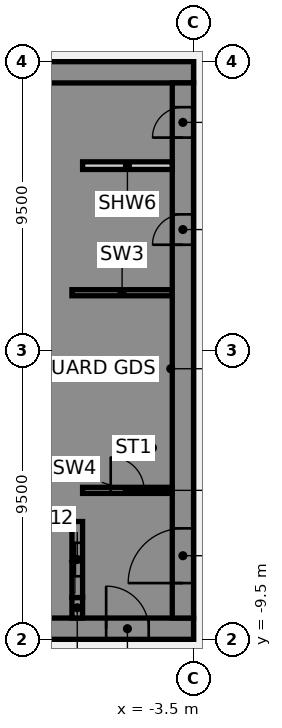
"""IFC4 building model, lengths in metres.
Left out: names, types, materials, properties, quantities, classifications, styles, units other than length and angle.
Written with IfcOpenShell. Run it as: python <this file> out.ifc"""

import sys

from ifc_helpers import new_model, si_unit, direction, frame, frame_2d, origin, place, context, subcontext, project, spatial, polyline, rectangle, outline, extrude, element, fill, save


model = new_model("IFC4")
c1 = context("Model", 3, precision=1e-05, world=origin(), true_north=direction((0.0, 1.0)))
c2 = subcontext(c1, "Body", "Model", "MODEL_VIEW")
j1 = project(units=[si_unit("LENGTHUNIT", "METRE"), si_unit("PLANEANGLEUNIT", "RADIAN")], contexts=[c1])
p1 = place(None, origin())
s1 = spatial("IfcSite", under=j1, at=p1, CompositionType="ELEMENT")
p2 = place(p1, origin())
s2 = spatial("IfcBuilding", under=s1, at=p2, CompositionType="ELEMENT")
p3 = place(p2, frame((0.0, 0.0, 56.5)))
s3 = spatial("IfcBuildingStorey", under=s2, at=p3, CompositionType="ELEMENT", Elevation=56.5)
p4 = place(p3, frame((-16.5, -9.15, 0.0), z_axis=(0.0, 0.0, 1.0), x_axis=(1.0, 0.0, 0.0)))
e1 = element("IfcWall", 1, at=p4, inside=s3, PredefinedType="SHEAR", context=c2, shape_type="SweptSolid", body=[
    extrude(rectangle(XDim=13.0, YDim=0.7, at=frame_2d((6.5, 0.0))), origin(), (0.0, 0.0, 1.0), 3.61),
])
p5 = place(p4, frame((4.15, 0.0, 0.0)))
e2 = element("IfcOpeningElement", 2, at=p5, cuts=e1, PredefinedType="OPENING", context=c2, shape_type="SweptSolid", body=[
    extrude(rectangle(XDim=1.4, YDim=2.1, at=frame_2d((0.7, 1.05))), frame((0.0, 0.36, 0.0), z_axis=(0.0, -1.0, 0.0), x_axis=(1.0, 0.0, 0.0)), (0.0, 0.0, 1.0), 0.72),
])
p6 = place(p4, frame((10.125, 0.0, 0.0)))
e3 = element("IfcOpeningElement", 3, at=p6, cuts=e1, PredefinedType="OPENING", context=c2, shape_type="SweptSolid", body=[
    extrude(rectangle(XDim=1.4, YDim=2.1, at=frame_2d((0.7, 1.05))), frame((0.0, 0.36, 0.0), z_axis=(0.0, -1.0, 0.0), x_axis=(1.0, 0.0, 0.0)), (0.0, 0.0, 1.0), 0.72),
])
p7 = place(p3, frame((-16.5, 9.15, 0.0), z_axis=(0.0, 0.0, 1.0), x_axis=(1.0, 0.0, 0.0)))
e4 = element("IfcWall", 4, at=p7, inside=s3, PredefinedType="SHEAR", context=c2, shape_type="SweptSolid", body=[
    extrude(rectangle(XDim=13.0, YDim=0.7, at=frame_2d((6.5, 0.0))), origin(), (0.0, 0.0, 1.0), 3.61),
])
p8 = place(p3, origin())
e5 = element("IfcWall", 5, at=p8, inside=s3, PredefinedType="SHEAR", context=c2, shape_type="SweptSolid", body=[
    extrude(outline(polyline([(-9.8, -5.375), (-9.8, -5.625), (-7.5, -5.625), (-7.15, -5.625), (-7.15, 8.8), (-7.5, 8.8), (-9.8, 8.8), (-9.8, 8.125), (-7.5, 8.125), (-7.5, 5.625), (-9.8, 5.625), (-9.8, 5.375), (-7.5, 5.375), (-7.5, 2.875), (-9.8, 2.875), (-9.8, 2.625), (-7.5, 2.625), (-7.5, 0.125), (-9.8, 0.125), (-9.8, -0.125), (-7.5, -0.125), (-7.5, -2.625), (-9.8, -2.625), (-9.8, -2.875), (-7.5, -2.875), (-7.5, -5.375), (-9.8, -5.375)])), origin(), (0.0, 0.0, 1.0), 3.61),
])
p9 = place(p3, origin())
e6 = element("IfcWall", 6, at=p9, inside=s3, PredefinedType="SHEAR", context=c2, shape_type="SweptSolid", body=[
    extrude(outline(polyline([(-7.5, -8.125), (-9.55, -8.125), (-9.55, -5.625), (-9.8, -5.625), (-9.8, -8.125), (-9.8, -8.8), (-7.5, -8.8), (-7.5, -8.125)])), origin(), (0.0, 0.0, 1.0), 3.61),
])
p10 = place(p3, frame((-7.325, -8.8, 0.0), z_axis=(0.0, 0.0, 1.0), x_axis=(0.0, 1.0, 0.0)))
e7 = element("IfcWall", 7, at=p10, inside=s3, PredefinedType="SHEAR", context=c2, shape_type="SweptSolid", body=[
    extrude(rectangle(XDim=0.675, YDim=0.35, at=frame_2d((0.337, 0.0))), origin(), (0.0, 0.0, 1.0), 3.61),
])
p11 = place(p3, frame((-7.5, 1.9, 0.0), z_axis=(0.0, 0.0, 1.0), x_axis=(1.0, 0.0, 0.0)))
e8 = element("IfcWall", 8, at=p11, inside=s3, PredefinedType="SHEAR", context=c2, shape_type="SweptSolid", body=[
    extrude(rectangle(XDim=3.3, YDim=0.2, at=frame_2d((1.65, 0.0))), origin(), (0.0, 0.0, 1.0), 3.61),
])
p12 = place(p3, frame((-7.325, -8.125, 0.0), z_axis=(0.0, 0.0, 1.0), x_axis=(0.0, 1.0, 0.0)))
e9 = element("IfcWall", 9, at=p12, inside=s3, PredefinedType="SHEAR", context=c2, shape_type="SweptSolid", body=[
    extrude(rectangle(XDim=2.5, YDim=0.35, at=frame_2d((1.25, 0.0))), origin(), (0.0, 0.0, 1.0), 3.61),
])
p13 = place(p12, frame((0.7, 0.0, 0.0)))
e10 = element("IfcOpeningElement", 10, at=p13, cuts=e9, PredefinedType="OPENING", context=c2, shape_type="SweptSolid", body=[
    extrude(rectangle(XDim=1.1, YDim=2.1, at=frame_2d((0.55, 1.05))), frame((0.0, 0.185, 0.0), z_axis=(0.0, -1.0, 0.0), x_axis=(1.0, 0.0, 0.0)), (0.0, 0.0, 1.0), 0.37),
])
p14 = place(p3, frame((-3.85, -8.8, 0.0), z_axis=(0.0, 0.0, 1.0), x_axis=(0.0, 1.0, 0.0)))
e11 = element("IfcWall", 11, at=p14, inside=s3, PredefinedType="SHEAR", context=c2, shape_type="SweptSolid", body=[
    extrude(rectangle(XDim=17.6, YDim=0.7, at=frame_2d((8.8, 0.0))), origin(), (0.0, 0.0, 1.0), 3.61),
])
p15 = place(p14, frame((1.15, 0.0, 0.0)))
e12 = element("IfcOpeningElement", 12, at=p15, cuts=e11, PredefinedType="OPENING", context=c2, shape_type="SweptSolid", body=[
    extrude(rectangle(XDim=1.8, YDim=2.1, at=frame_2d((0.9, 1.05))), frame((0.0, 0.36, 0.0), z_axis=(0.0, -1.0, 0.0), x_axis=(1.0, 0.0, 0.0)), (0.0, 0.0, 1.0), 0.72),
])
p16 = place(p14, frame((12.278, 0.0, 0.0)))
e13 = element("IfcOpeningElement", 13, at=p16, cuts=e11, PredefinedType="OPENING", context=c2, shape_type="SweptSolid", body=[
    extrude(rectangle(XDim=1.0, YDim=2.1, at=frame_2d((0.5, 1.05))), frame((0.0, 0.36, 0.0), z_axis=(0.0, -1.0, 0.0), x_axis=(1.0, 0.0, 0.0)), (0.0, 0.0, 1.0), 0.72),
])
p17 = place(p14, frame((15.802, 0.0, 0.0)))
e14 = element("IfcOpeningElement", 14, at=p17, cuts=e11, PredefinedType="OPENING", context=c2, shape_type="SweptSolid", body=[
    extrude(rectangle(XDim=1.0, YDim=2.1, at=frame_2d((0.5, 1.05))), frame((0.0, 0.36, 0.0), z_axis=(0.0, -1.0, 0.0), x_axis=(1.0, 0.0, 0.0)), (0.0, 0.0, 1.0), 0.72),
])
p18 = place(p3, frame((-7.15, 6.08, 0.0), z_axis=(0.0, 0.0, 1.0), x_axis=(1.0, 0.0, 0.0)))
e15 = element("IfcWall", 15, at=p18, inside=s3, PredefinedType="PARTITIONING", context=c2, shape_type="SweptSolid", body=[
    extrude(rectangle(XDim=2.95, YDim=0.25, at=frame_2d((1.475, 0.0))), origin(), (0.0, 0.0, 1.0), 3.61),
])
p19 = place(p3, frame((-7.15, -4.6, 0.0), z_axis=(0.0, 0.0, 1.0), x_axis=(1.0, 0.0, 0.0)))
e16 = element("IfcWall", 16, at=p19, inside=s3, PredefinedType="SHEAR", context=c2, shape_type="SweptSolid", body=[
    extrude(rectangle(XDim=2.95, YDim=0.2, at=frame_2d((1.475, 0.0))), origin(), (0.0, 0.0, 1.0), 3.61),
])
p20 = place(p19, frame((0.925, 0.0, 0.0)))
e17 = element("IfcOpeningElement", 17, at=p20, cuts=e16, PredefinedType="OPENING", context=c2, shape_type="SweptSolid", body=[
    extrude(rectangle(XDim=1.1, YDim=2.1, at=frame_2d((0.55, 1.05))), frame((0.0, 0.11, 0.0), z_axis=(0.0, -1.0, 0.0), x_axis=(1.0, 0.0, 0.0)), (0.0, 0.0, 1.0), 0.22),
])
p21 = place(p6, origin())
e18 = element("IfcDoor", 18, at=p21, inside=s3, OperationType="SINGLE_SWING_LEFT", PredefinedType="DOOR", context=c2, shape_type="SweptSolid", body=[
    extrude(rectangle(XDim=1.4, YDim=2.1, at=frame_2d((0.7, 1.05))), frame((0.0, 0.025, 0.0), z_axis=(0.0, -1.0, 0.0), x_axis=(1.0, 0.0, 0.0)), (0.0, 0.0, 1.0), 0.05),
])
fill(e3, e18)
p22 = place(p15, origin())
e19 = element("IfcDoor", 19, at=p22, inside=s3, OperationType="SINGLE_SWING_LEFT", PredefinedType="DOOR", context=c2, shape_type="SweptSolid", body=[
    extrude(rectangle(XDim=1.8, YDim=2.1, at=frame_2d((0.9, 1.05))), frame((0.0, 0.025, 0.0), z_axis=(0.0, -1.0, 0.0), x_axis=(1.0, 0.0, 0.0)), (0.0, 0.0, 1.0), 0.05),
])
fill(e12, e19)
p23 = place(p16, origin())
e20 = element("IfcDoor", 20, at=p23, inside=s3, OperationType="SINGLE_SWING_LEFT", PredefinedType="DOOR", context=c2, shape_type="SweptSolid", body=[
    extrude(rectangle(XDim=1.0, YDim=2.1, at=frame_2d((0.5, 1.05))), frame((0.0, 0.325, 0.0), z_axis=(0.0, -1.0, 0.0), x_axis=(1.0, 0.0, 0.0)), (0.0, 0.0, 1.0), 0.05),
])
fill(e13, e20)
p24 = place(p17, origin())
e21 = element("IfcDoor", 21, at=p24, inside=s3, OperationType="SINGLE_SWING_LEFT", PredefinedType="DOOR", context=c2, shape_type="SweptSolid", body=[
    extrude(rectangle(XDim=1.0, YDim=2.1, at=frame_2d((0.5, 1.05))), frame((0.0, 0.325, 0.0), z_axis=(0.0, -1.0, 0.0), x_axis=(1.0, 0.0, 0.0)), (0.0, 0.0, 1.0), 0.05),
])
fill(e14, e21)
p25 = place(p20, origin())
e22 = element("IfcDoor", 22, at=p25, inside=s3, OperationType="SINGLE_SWING_LEFT", PredefinedType="DOOR", context=c2, shape_type="SweptSolid", body=[
    extrude(rectangle(XDim=1.1, YDim=2.1, at=frame_2d((0.55, 1.05))), frame((0.0, 0.025, 0.0), z_axis=(0.0, -1.0, 0.0), x_axis=(1.0, 0.0, 0.0)), (0.0, 0.0, 1.0), 0.05),
])
fill(e17, e22)
p26 = place(p13, origin())
e23 = element("IfcDoor", 23, at=p26, inside=s3, OperationType="SLIDING_TO_LEFT", PredefinedType="DOOR", context=c2, shape_type="SweptSolid", body=[
    extrude(rectangle(XDim=1.1, YDim=2.1, at=frame_2d((0.55, 1.05))), frame((0.0, 0.025, 0.0), z_axis=(0.0, -1.0, 0.0), x_axis=(1.0, 0.0, 0.0)), (0.0, 0.0, 1.0), 0.05),
])
fill(e10, e23)
save(model, sys.argv[1])
